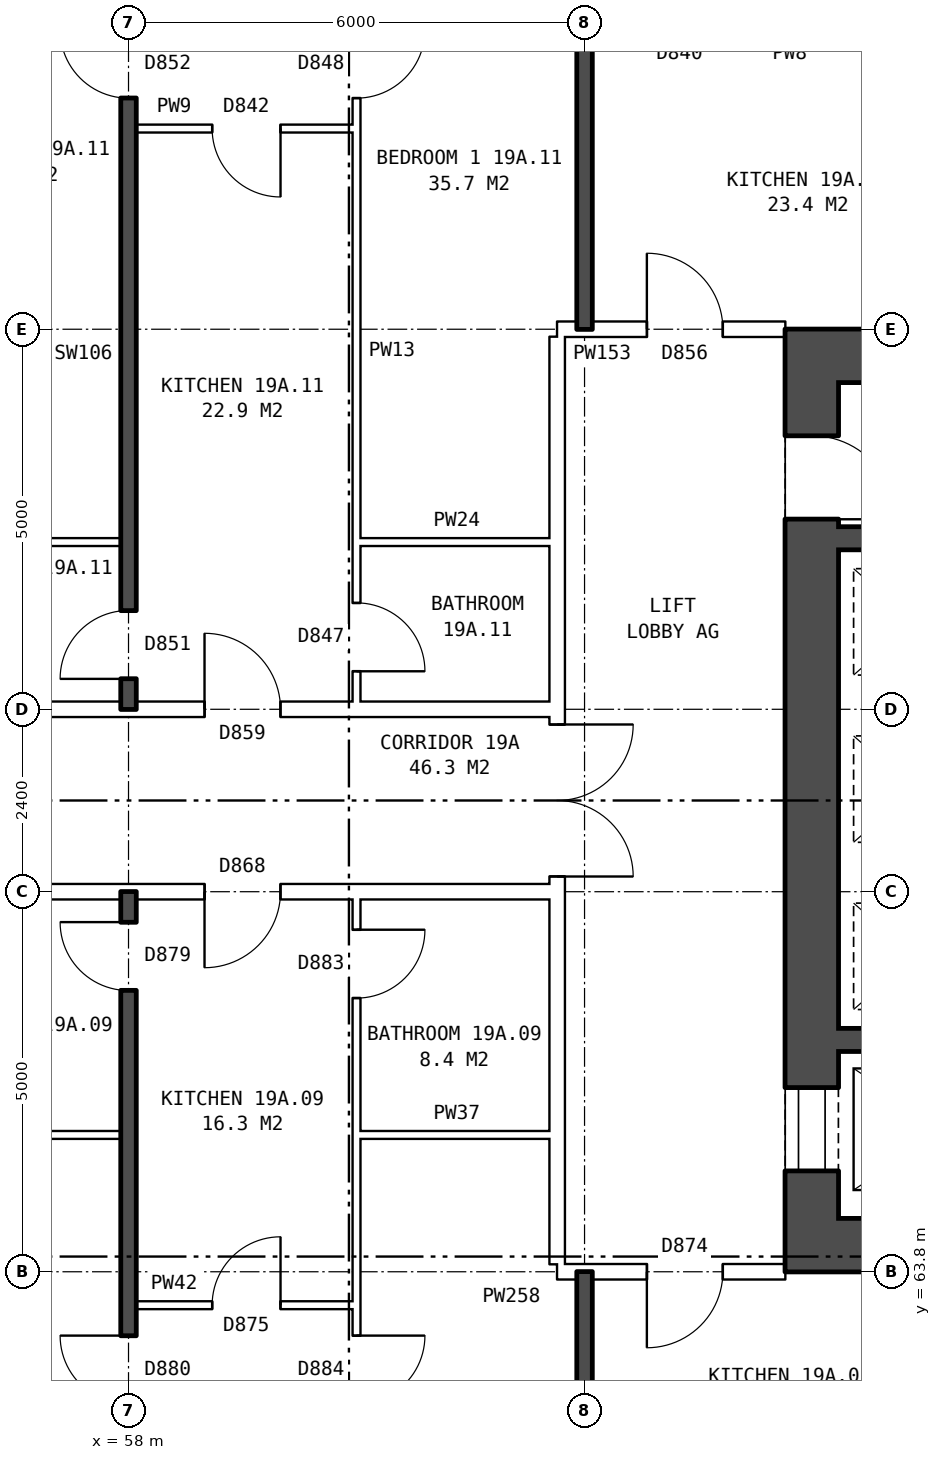
"""IFC4 building model, lengths in metres.
Left out: names, types, materials, properties, quantities, classifications, styles, units other than length and angle.
Written with IfcOpenShell. Run it as: python <this file> out.ifc"""

import sys

from ifc_helpers import new_model, si_unit, direction, frame, frame_2d, origin, place, context, subcontext, project, spatial, rectangle, extrude, element, fill, save


model = new_model("IFC4")
c1 = context("Model", 3, precision=1e-05, world=origin(), true_north=direction((0.0, 1.0)))
c2 = subcontext(c1, "Body", "Model", "MODEL_VIEW")
j1 = project(units=[si_unit("LENGTHUNIT", "METRE"), si_unit("PLANEANGLEUNIT", "RADIAN")], contexts=[c1])
p1 = place(None, origin())
s1 = spatial("IfcSite", under=j1, at=p1, CompositionType="ELEMENT")
p2 = place(p1, origin())
s2 = spatial("IfcBuilding", under=s1, at=p2, CompositionType="ELEMENT")
p3 = place(p2, frame((0.0, 0.0, 71.6)))
s3 = spatial("IfcBuildingStorey", under=s2, at=p3, CompositionType="ELEMENT", Elevation=71.6)
p4 = place(p3, frame((66.99, 64.5, 0.0), z_axis=(0.0, 0.0, 1.0), x_axis=(0.0, 1.0, 0.0)))
e1 = element("IfcWall", 1, at=p4, inside=s3, PredefinedType="SHEAR", context=c2, shape_type="SweptSolid", body=[
    extrude(rectangle(XDim=11.0, YDim=0.7, at=frame_2d((5.5, 0.0))), origin(), (0.0, 0.0, 1.0), 2.85),
])
p5 = place(p4, frame((0.625, 0.0, 0.0)))
e2 = element("IfcOpeningElement", 2, at=p5, cuts=e1, PredefinedType="OPENING", context=c2, shape_type="SweptSolid", body=[
    extrude(rectangle(XDim=1.1, YDim=2.1, at=frame_2d((0.55, 1.05))), frame((0.0, 0.36, 0.0), z_axis=(0.0, -1.0, 0.0), x_axis=(1.0, 0.0, 0.0)), (0.0, 0.0, 1.0), 0.72),
])
p6 = place(p4, frame((9.2, 0.0, 0.0)))
e3 = element("IfcOpeningElement", 3, at=p6, cuts=e1, PredefinedType="OPENING", context=c2, shape_type="SweptSolid", body=[
    extrude(rectangle(XDim=1.1, YDim=2.1, at=frame_2d((0.55, 1.05))), frame((0.0, 0.36, 0.0), z_axis=(0.0, -1.0, 0.0), x_axis=(1.0, 0.0, 0.0)), (0.0, 0.0, 1.0), 0.72),
])
for number, where, z_axis, x_axis in (
    (4, (66.64, 64.15, 0.0), (0.0, 0.0, 1.0), (1.0, 0.0, 0.0)),
    (5, (66.64, 75.85, 0.0), (0.0, 0.0, 1.0), (1.0, 0.0, 0.0)),
):
    element("IfcWall", number, at=place(p3, frame(where, z_axis=z_axis, x_axis=x_axis)), inside=s3, PredefinedType="SHEAR", context=c2, shape_type="SweptSolid", body=[
        extrude(rectangle(XDim=9.0, YDim=0.7, at=frame_2d((4.5, 0.0))), origin(), (0.0, 0.0, 1.0), 2.85),
    ])
p7 = place(p3, frame((67.34, 66.85, 0.0), z_axis=(0.0, 0.0, 1.0), x_axis=(1.0, 0.0, 0.0)))
e6 = element("IfcWall", 6, at=p7, inside=s3, PredefinedType="SHEAR", context=c2, shape_type="SweptSolid", body=[
    extrude(rectangle(XDim=3.32, YDim=0.3, at=frame_2d((1.66, 0.0))), origin(), (0.0, 0.0, 1.0), 2.85),
])
p8 = place(p3, frame((67.34, 73.45, 0.0), z_axis=(0.0, 0.0, 1.0), x_axis=(1.0, 0.0, 0.0)))
e7 = element("IfcWall", 7, at=p8, inside=s3, PredefinedType="SHEAR", context=c2, shape_type="SweptSolid", body=[
    extrude(rectangle(XDim=2.2, YDim=0.3, at=frame_2d((1.1, 0.0))), origin(), (0.0, 0.0, 1.0), 2.85),
])
p9 = place(p3, frame((63.64, 63.9, 0.0), z_axis=(0.0, 0.0, 1.0), x_axis=(0.0, 1.0, 0.0)))
e8 = element("IfcWall", 8, at=p9, inside=s3, PredefinedType="PARTITIONING", context=c2, shape_type="SweptSolid", body=[
    extrude(rectangle(XDim=12.2, YDim=0.2, at=frame_2d((6.1, 0.0))), origin(), (0.0, 0.0, 1.0), 2.85),
])
p10 = place(p9, frame((5.1, 0.0, 0.0)))
e9 = element("IfcOpeningElement", 9, at=p10, cuts=e8, PredefinedType="OPENING", context=c2, shape_type="SweptSolid", body=[
    extrude(rectangle(XDim=2.0, YDim=2.1, at=frame_2d((1.0, 1.05))), frame((0.0, 0.11, 0.0), z_axis=(0.0, -1.0, 0.0), x_axis=(1.0, 0.0, 0.0)), (0.0, 0.0, 1.0), 0.22),
])
p11 = place(p3, frame((58.1, 63.36, 0.0), z_axis=(0.0, 0.0, 1.0), x_axis=(1.0, 0.0, 0.0)))
e10 = element("IfcWall", 10, at=p11, inside=s3, PredefinedType="PARTITIONING", context=c2, shape_type="SweptSolid", body=[
    extrude(rectangle(XDim=2.9, YDim=0.1, at=frame_2d((1.45, 0.0))), origin(), (0.0, 0.0, 1.0), 2.85),
])
p12 = place(p11, frame((1.0, 0.0, 0.0)))
e11 = element("IfcOpeningElement", 11, at=p12, cuts=e10, PredefinedType="OPENING", context=c2, shape_type="SweptSolid", body=[
    extrude(rectangle(XDim=0.9, YDim=2.1, at=frame_2d((0.45, 1.05))), frame((0.0, 0.06, 0.0), z_axis=(0.0, -1.0, 0.0), x_axis=(1.0, 0.0, 0.0)), (0.0, 0.0, 1.0), 0.12),
])
p13 = place(p3, frame((63.64, 63.8, 0.0), z_axis=(0.0, 0.0, 1.0), x_axis=(1.0, 0.0, 0.0)))
e12 = element("IfcWall", 12, at=p13, inside=s3, PredefinedType="PARTITIONING", context=c2, shape_type="SweptSolid", body=[
    extrude(rectangle(XDim=3.0, YDim=0.2, at=frame_2d((1.5, 0.0))), origin(), (0.0, 0.0, 1.0), 2.85),
])
p14 = place(p13, frame((1.18, 0.0, 0.0)))
e13 = element("IfcOpeningElement", 13, at=p14, cuts=e12, PredefinedType="OPENING", context=c2, shape_type="SweptSolid", body=[
    extrude(rectangle(XDim=1.0, YDim=2.1, at=frame_2d((0.5, 1.05))), frame((0.0, 0.11, 0.0), z_axis=(0.0, -1.0, 0.0), x_axis=(1.0, 0.0, 0.0)), (0.0, 0.0, 1.0), 0.22),
])
p15 = place(p3, frame((55.1, 65.6, 0.0), z_axis=(0.0, 0.0, 1.0), x_axis=(1.0, 0.0, 0.0)))
e14 = element("IfcWall", 14, at=p15, inside=s3, PredefinedType="PARTITIONING", context=c2, shape_type="SweptSolid", body=[
    extrude(rectangle(XDim=2.8, YDim=0.1, at=frame_2d((1.4, 0.0))), origin(), (0.0, 0.0, 1.0), 2.85),
])
p16 = place(p3, frame((61.0, 65.6, 0.0), z_axis=(0.0, 0.0, 1.0), x_axis=(1.0, 0.0, 0.0)))
e15 = element("IfcWall", 15, at=p16, inside=s3, PredefinedType="PARTITIONING", context=c2, shape_type="SweptSolid", body=[
    extrude(rectangle(XDim=2.64, YDim=0.1, at=frame_2d((1.32, 0.0))), origin(), (0.0, 0.0, 1.0), 2.85),
])
p17 = place(p3, frame((44.36, 68.8, 0.0), z_axis=(0.0, 0.0, 1.0), x_axis=(1.0, 0.0, 0.0)))
e16 = element("IfcWall", 16, at=p17, inside=s3, PredefinedType="PARTITIONING", context=c2, shape_type="SweptSolid", body=[
    extrude(rectangle(XDim=19.28, YDim=0.2, at=frame_2d((9.64, 0.0))), origin(), (0.0, 0.0, 1.0), 2.85),
])
p18 = place(p17, frame((14.64, 0.0, 0.0)))
e17 = element("IfcOpeningElement", 17, at=p18, cuts=e16, PredefinedType="OPENING", context=c2, shape_type="SweptSolid", body=[
    extrude(rectangle(XDim=1.0, YDim=2.1, at=frame_2d((0.5, 1.05))), frame((0.0, 0.11, 0.0), z_axis=(0.0, -1.0, 0.0), x_axis=(1.0, 0.0, 0.0)), (0.0, 0.0, 1.0), 0.22),
])
p19 = place(p17, frame((5.64, 0.0, 0.0)))
e18 = element("IfcOpeningElement", 18, at=p19, cuts=e16, PredefinedType="OPENING", context=c2, shape_type="SweptSolid", body=[
    extrude(rectangle(XDim=1.0, YDim=2.1, at=frame_2d((0.5, 1.05))), frame((0.0, 0.11, 0.0), z_axis=(0.0, -1.0, 0.0), x_axis=(1.0, 0.0, 0.0)), (0.0, 0.0, 1.0), 0.22),
])
p20 = place(p3, frame((44.36, 71.2, 0.0), z_axis=(0.0, 0.0, 1.0), x_axis=(1.0, 0.0, 0.0)))
e19 = element("IfcWall", 19, at=p20, inside=s3, PredefinedType="PARTITIONING", context=c2, shape_type="SweptSolid", body=[
    extrude(rectangle(XDim=19.28, YDim=0.2, at=frame_2d((9.64, 0.0))), origin(), (0.0, 0.0, 1.0), 2.85),
])
p21 = place(p20, frame((14.64, 0.0, 0.0)))
e20 = element("IfcOpeningElement", 20, at=p21, cuts=e19, PredefinedType="OPENING", context=c2, shape_type="SweptSolid", body=[
    extrude(rectangle(XDim=1.0, YDim=2.1, at=frame_2d((0.5, 1.05))), frame((0.0, 0.11, 0.0), z_axis=(0.0, -1.0, 0.0), x_axis=(1.0, 0.0, 0.0)), (0.0, 0.0, 1.0), 0.22),
])
p22 = place(p20, frame((5.64, 0.0, 0.0)))
e21 = element("IfcOpeningElement", 21, at=p22, cuts=e19, PredefinedType="OPENING", context=c2, shape_type="SweptSolid", body=[
    extrude(rectangle(XDim=1.0, YDim=2.1, at=frame_2d((0.5, 1.05))), frame((0.0, 0.11, 0.0), z_axis=(0.0, -1.0, 0.0), x_axis=(1.0, 0.0, 0.0)), (0.0, 0.0, 1.0), 0.22),
])
p23 = place(p3, frame((55.1, 73.4, 0.0), z_axis=(0.0, 0.0, 1.0), x_axis=(1.0, 0.0, 0.0)))
e22 = element("IfcWall", 22, at=p23, inside=s3, PredefinedType="PARTITIONING", context=c2, shape_type="SweptSolid", body=[
    extrude(rectangle(XDim=2.8, YDim=0.1, at=frame_2d((1.4, 0.0))), origin(), (0.0, 0.0, 1.0), 2.85),
])
p24 = place(p3, frame((61.0, 73.4, 0.0), z_axis=(0.0, 0.0, 1.0), x_axis=(1.0, 0.0, 0.0)))
e23 = element("IfcWall", 23, at=p24, inside=s3, PredefinedType="PARTITIONING", context=c2, shape_type="SweptSolid", body=[
    extrude(rectangle(XDim=2.64, YDim=0.1, at=frame_2d((1.32, 0.0))), origin(), (0.0, 0.0, 1.0), 2.85),
])
p25 = place(p3, frame((63.64, 76.2, 0.0), z_axis=(0.0, 0.0, 1.0), x_axis=(1.0, 0.0, 0.0)))
e24 = element("IfcWall", 24, at=p25, inside=s3, PredefinedType="PARTITIONING", context=c2, shape_type="SweptSolid", body=[
    extrude(rectangle(XDim=3.0, YDim=0.2, at=frame_2d((1.5, 0.0))), origin(), (0.0, 0.0, 1.0), 2.85),
])
p26 = place(p25, frame((1.18, 0.0, 0.0)))
e25 = element("IfcOpeningElement", 25, at=p26, cuts=e24, PredefinedType="OPENING", context=c2, shape_type="SweptSolid", body=[
    extrude(rectangle(XDim=1.0, YDim=2.1, at=frame_2d((0.5, 1.05))), frame((0.0, 0.11, 0.0), z_axis=(0.0, -1.0, 0.0), x_axis=(1.0, 0.0, 0.0)), (0.0, 0.0, 1.0), 0.22),
])
p27 = place(p3, frame((58.1, 78.84, 0.0), z_axis=(0.0, 0.0, 1.0), x_axis=(1.0, 0.0, 0.0)))
e26 = element("IfcWall", 26, at=p27, inside=s3, PredefinedType="PARTITIONING", context=c2, shape_type="SweptSolid", body=[
    extrude(rectangle(XDim=2.9, YDim=0.1, at=frame_2d((1.45, 0.0))), origin(), (0.0, 0.0, 1.0), 2.85),
])
p28 = place(p27, frame((1.0, 0.0, 0.0)))
e27 = element("IfcOpeningElement", 27, at=p28, cuts=e26, PredefinedType="OPENING", context=c2, shape_type="SweptSolid", body=[
    extrude(rectangle(XDim=0.9, YDim=2.1, at=frame_2d((0.45, 1.05))), frame((0.0, 0.06, 0.0), z_axis=(0.0, -1.0, 0.0), x_axis=(1.0, 0.0, 0.0)), (0.0, 0.0, 1.0), 0.12),
])
p29 = place(p3, frame((58.0, 54.36, 0.0), z_axis=(0.0, 0.0, 1.0), x_axis=(0.0, 1.0, 0.0)))
e28 = element("IfcWall", 28, at=p29, inside=s3, PredefinedType="SOLIDWALL", context=c2, shape_type="SweptSolid", body=[
    extrude(rectangle(XDim=14.44, YDim=0.2, at=frame_2d((7.22, 0.0))), origin(), (0.0, 0.0, 1.0), 2.85),
])
p30 = place(p29, frame((7.7, 0.0, 0.0)))
e29 = element("IfcOpeningElement", 29, at=p30, cuts=e28, PredefinedType="OPENING", context=c2, shape_type="SweptSolid", body=[
    extrude(rectangle(XDim=0.9, YDim=2.1, at=frame_2d((0.45, 1.05))), frame((0.0, 0.11, 0.0), z_axis=(0.0, -1.0, 0.0), x_axis=(1.0, 0.0, 0.0)), (0.0, 0.0, 1.0), 0.22),
])
p31 = place(p29, frame((13.14, 0.0, 0.0)))
e30 = element("IfcOpeningElement", 30, at=p31, cuts=e28, PredefinedType="OPENING", context=c2, shape_type="SweptSolid", body=[
    extrude(rectangle(XDim=0.9, YDim=2.1, at=frame_2d((0.45, 1.05))), frame((0.0, 0.11, 0.0), z_axis=(0.0, -1.0, 0.0), x_axis=(1.0, 0.0, 0.0)), (0.0, 0.0, 1.0), 0.22),
])
p32 = place(p3, frame((58.0, 71.2, 0.0), z_axis=(0.0, 0.0, 1.0), x_axis=(0.0, 1.0, 0.0)))
e31 = element("IfcWall", 31, at=p32, inside=s3, PredefinedType="SOLIDWALL", context=c2, shape_type="SweptSolid", body=[
    extrude(rectangle(XDim=14.44, YDim=0.2, at=frame_2d((7.22, 0.0))), origin(), (0.0, 0.0, 1.0), 2.85),
])
p33 = place(p32, frame((8.04, 0.0, 0.0)))
e32 = element("IfcOpeningElement", 32, at=p33, cuts=e31, PredefinedType="OPENING", context=c2, shape_type="SweptSolid", body=[
    extrude(rectangle(XDim=0.9, YDim=2.1, at=frame_2d((0.45, 1.05))), frame((0.0, 0.11, 0.0), z_axis=(0.0, -1.0, 0.0), x_axis=(1.0, 0.0, 0.0)), (0.0, 0.0, 1.0), 0.22),
])
p34 = place(p32, frame((0.4, 0.0, 0.0)))
e33 = element("IfcOpeningElement", 33, at=p34, cuts=e31, PredefinedType="OPENING", context=c2, shape_type="SweptSolid", body=[
    extrude(rectangle(XDim=0.9, YDim=2.1, at=frame_2d((0.45, 1.05))), frame((0.0, 0.11, 0.0), z_axis=(0.0, -1.0, 0.0), x_axis=(1.0, 0.0, 0.0)), (0.0, 0.0, 1.0), 0.22),
])
p35 = place(p3, frame((61.0, 54.36, 0.0), z_axis=(0.0, 0.0, 1.0), x_axis=(0.0, 1.0, 0.0)))
e34 = element("IfcWall", 34, at=p35, inside=s3, PredefinedType="PARTITIONING", context=c2, shape_type="SweptSolid", body=[
    extrude(rectangle(XDim=14.34, YDim=0.1, at=frame_2d((7.17, 0.0))), origin(), (0.0, 0.0, 1.0), 2.85),
])
p36 = place(p35, frame((7.7, 0.0, 0.0)))
e35 = element("IfcOpeningElement", 35, at=p36, cuts=e34, PredefinedType="OPENING", context=c2, shape_type="SweptSolid", body=[
    extrude(rectangle(XDim=0.9, YDim=2.1, at=frame_2d((0.45, 1.05))), frame((0.0, 0.06, 0.0), z_axis=(0.0, -1.0, 0.0), x_axis=(1.0, 0.0, 0.0)), (0.0, 0.0, 1.0), 0.12),
])
p37 = place(p35, frame((13.04, 0.0, 0.0)))
e36 = element("IfcOpeningElement", 36, at=p37, cuts=e34, PredefinedType="OPENING", context=c2, shape_type="SweptSolid", body=[
    extrude(rectangle(XDim=0.9, YDim=2.1, at=frame_2d((0.45, 1.05))), frame((0.0, 0.06, 0.0), z_axis=(0.0, -1.0, 0.0), x_axis=(1.0, 0.0, 0.0)), (0.0, 0.0, 1.0), 0.12),
])
p38 = place(p3, frame((61.0, 71.3, 0.0), z_axis=(0.0, 0.0, 1.0), x_axis=(0.0, 1.0, 0.0)))
e37 = element("IfcWall", 37, at=p38, inside=s3, PredefinedType="PARTITIONING", context=c2, shape_type="SweptSolid", body=[
    extrude(rectangle(XDim=14.34, YDim=0.1, at=frame_2d((7.17, 0.0))), origin(), (0.0, 0.0, 1.0), 2.85),
])
p39 = place(p38, frame((7.94, 0.0, 0.0)))
e38 = element("IfcOpeningElement", 38, at=p39, cuts=e37, PredefinedType="OPENING", context=c2, shape_type="SweptSolid", body=[
    extrude(rectangle(XDim=0.9, YDim=2.1, at=frame_2d((0.45, 1.05))), frame((0.0, 0.06, 0.0), z_axis=(0.0, -1.0, 0.0), x_axis=(1.0, 0.0, 0.0)), (0.0, 0.0, 1.0), 0.12),
])
p40 = place(p38, frame((0.4, 0.0, 0.0)))
e39 = element("IfcOpeningElement", 39, at=p40, cuts=e37, PredefinedType="OPENING", context=c2, shape_type="SweptSolid", body=[
    extrude(rectangle(XDim=0.9, YDim=2.1, at=frame_2d((0.45, 1.05))), frame((0.0, 0.06, 0.0), z_axis=(0.0, -1.0, 0.0), x_axis=(1.0, 0.0, 0.0)), (0.0, 0.0, 1.0), 0.12),
])
for number, where, z_axis, x_axis in (
    (40, (64.0, 54.36, 0.0), (0.0, 0.0, 1.0), (0.0, 1.0, 0.0)),
    (41, (64.0, 76.2, 0.0), (0.0, 0.0, 1.0), (0.0, 1.0, 0.0)),
):
    element("IfcWall", number, at=place(p3, frame(where, z_axis=z_axis, x_axis=x_axis)), inside=s3, PredefinedType="SOLIDWALL", context=c2, shape_type="SweptSolid", body=[
        extrude(rectangle(XDim=9.44, YDim=0.2, at=frame_2d((4.72, 0.0))), origin(), (0.0, 0.0, 1.0), 2.85),
    ])
p41 = place(p5, origin())
e42 = element("IfcDoor", 42, at=p41, inside=s3, OperationType="DOUBLE_DOOR_SLIDING", PredefinedType="DOOR", context=c2, shape_type="SweptSolid", body=[
    extrude(rectangle(XDim=1.1, YDim=2.1, at=frame_2d((0.55, 1.05))), frame((0.0, -0.285, 0.0), z_axis=(0.0, -1.0, 0.0), x_axis=(1.0, 0.0, 0.0)), (0.0, 0.0, 1.0), 0.05),
])
fill(e2, e42)
p42 = place(p6, frame((1.1, 0.0, 0.0), z_axis=(0.0, 0.0, 1.0), x_axis=(-1.0, 0.0, 0.0)))
e43 = element("IfcDoor", 43, at=p42, inside=s3, OperationType="SINGLE_SWING_RIGHT", PredefinedType="DOOR", context=c2, shape_type="SweptSolid", body=[
    extrude(rectangle(XDim=1.1, YDim=2.1, at=frame_2d((0.55, 1.05))), frame((0.0, 0.335, 0.0), z_axis=(0.0, -1.0, 0.0), x_axis=(1.0, 0.0, 0.0)), (0.0, 0.0, 1.0), 0.05),
])
fill(e3, e43)
p43 = place(p10, frame((2.0, 0.0, 0.0), z_axis=(0.0, 0.0, 1.0), x_axis=(-1.0, 0.0, 0.0)))
e44 = element("IfcDoor", 44, at=p43, inside=s3, OperationType="DOUBLE_DOOR_SINGLE_SWING", PredefinedType="DOOR", context=c2, shape_type="SweptSolid", body=[
    extrude(rectangle(XDim=2.0, YDim=2.1, at=frame_2d((1.0, 1.05))), frame((0.0, 0.025, 0.0), z_axis=(0.0, -1.0, 0.0), x_axis=(1.0, 0.0, 0.0)), (0.0, 0.0, 1.0), 0.05),
])
fill(e9, e44)
p44 = place(p14, frame((1.0, 0.0, 0.0), z_axis=(0.0, 0.0, 1.0), x_axis=(-1.0, 0.0, 0.0)))
e45 = element("IfcDoor", 45, at=p44, inside=s3, OperationType="SINGLE_SWING_RIGHT", PredefinedType="DOOR", context=c2, shape_type="SweptSolid", body=[
    extrude(rectangle(XDim=1.0, YDim=2.1, at=frame_2d((0.5, 1.05))), frame((0.0, 0.025, 0.0), z_axis=(0.0, -1.0, 0.0), x_axis=(1.0, 0.0, 0.0)), (0.0, 0.0, 1.0), 0.05),
])
fill(e13, e45)
p45 = place(p26, origin())
e46 = element("IfcDoor", 46, at=p45, inside=s3, OperationType="SINGLE_SWING_LEFT", PredefinedType="DOOR", context=c2, shape_type="SweptSolid", body=[
    extrude(rectangle(XDim=1.0, YDim=2.1, at=frame_2d((0.5, 1.05))), frame((0.0, 0.025, 0.0), z_axis=(0.0, -1.0, 0.0), x_axis=(1.0, 0.0, 0.0)), (0.0, 0.0, 1.0), 0.05),
])
fill(e25, e46)
p46 = place(p36, frame((0.9, 0.0, 0.0), z_axis=(0.0, 0.0, 1.0), x_axis=(-1.0, 0.0, 0.0)))
e47 = element("IfcDoor", 47, at=p46, inside=s3, OperationType="SINGLE_SWING_LEFT", PredefinedType="DOOR", context=c2, shape_type="SweptSolid", body=[
    extrude(rectangle(XDim=0.9, YDim=2.1, at=frame_2d((0.45, 1.05))), frame((0.0, 0.025, 0.0), z_axis=(0.0, -1.0, 0.0), x_axis=(1.0, 0.0, 0.0)), (0.0, 0.0, 1.0), 0.05),
])
fill(e35, e47)
p47 = place(p30, origin())
e48 = element("IfcDoor", 48, at=p47, inside=s3, OperationType="SINGLE_SWING_RIGHT", PredefinedType="DOOR", context=c2, shape_type="SweptSolid", body=[
    extrude(rectangle(XDim=0.9, YDim=2.1, at=frame_2d((0.45, 1.05))), frame((0.0, 0.025, 0.0), z_axis=(0.0, -1.0, 0.0), x_axis=(1.0, 0.0, 0.0)), (0.0, 0.0, 1.0), 0.05),
])
fill(e29, e48)
p48 = place(p18, frame((1.0, 0.0, 0.0), z_axis=(0.0, 0.0, 1.0), x_axis=(-1.0, 0.0, 0.0)))
e49 = element("IfcDoor", 49, at=p48, inside=s3, OperationType="SINGLE_SWING_RIGHT", PredefinedType="DOOR", context=c2, shape_type="SweptSolid", body=[
    extrude(rectangle(XDim=1.0, YDim=2.1, at=frame_2d((0.5, 1.05))), frame((0.0, 0.025, 0.0), z_axis=(0.0, -1.0, 0.0), x_axis=(1.0, 0.0, 0.0)), (0.0, 0.0, 1.0), 0.05),
])
fill(e17, e49)
p49 = place(p12, origin())
e50 = element("IfcDoor", 50, at=p49, inside=s3, OperationType="SINGLE_SWING_RIGHT", PredefinedType="DOOR", context=c2, shape_type="SweptSolid", body=[
    extrude(rectangle(XDim=0.9, YDim=2.1, at=frame_2d((0.45, 1.05))), frame((0.0, 0.025, 0.0), z_axis=(0.0, -1.0, 0.0), x_axis=(1.0, 0.0, 0.0)), (0.0, 0.0, 1.0), 0.05),
])
fill(e11, e50)
p50 = place(p37, frame((0.9, 0.0, 0.0), z_axis=(0.0, 0.0, 1.0), x_axis=(-1.0, 0.0, 0.0)))
e51 = element("IfcDoor", 51, at=p50, inside=s3, OperationType="SINGLE_SWING_LEFT", PredefinedType="DOOR", context=c2, shape_type="SweptSolid", body=[
    extrude(rectangle(XDim=0.9, YDim=2.1, at=frame_2d((0.45, 1.05))), frame((0.0, 0.025, 0.0), z_axis=(0.0, -1.0, 0.0), x_axis=(1.0, 0.0, 0.0)), (0.0, 0.0, 1.0), 0.05),
])
fill(e36, e51)
p51 = place(p31, origin())
e52 = element("IfcDoor", 52, at=p51, inside=s3, OperationType="SINGLE_SWING_RIGHT", PredefinedType="DOOR", context=c2, shape_type="SweptSolid", body=[
    extrude(rectangle(XDim=0.9, YDim=2.1, at=frame_2d((0.45, 1.05))), frame((0.0, 0.025, 0.0), z_axis=(0.0, -1.0, 0.0), x_axis=(1.0, 0.0, 0.0)), (0.0, 0.0, 1.0), 0.05),
])
fill(e30, e52)
p52 = place(p39, frame((0.9, 0.0, 0.0), z_axis=(0.0, 0.0, 1.0), x_axis=(-1.0, 0.0, 0.0)))
e53 = element("IfcDoor", 53, at=p52, inside=s3, OperationType="SINGLE_SWING_LEFT", PredefinedType="DOOR", context=c2, shape_type="SweptSolid", body=[
    extrude(rectangle(XDim=0.9, YDim=2.1, at=frame_2d((0.45, 1.05))), frame((0.0, 0.025, 0.0), z_axis=(0.0, -1.0, 0.0), x_axis=(1.0, 0.0, 0.0)), (0.0, 0.0, 1.0), 0.05),
])
fill(e38, e53)
p53 = place(p33, origin())
e54 = element("IfcDoor", 54, at=p53, inside=s3, OperationType="SINGLE_SWING_RIGHT", PredefinedType="DOOR", context=c2, shape_type="SweptSolid", body=[
    extrude(rectangle(XDim=0.9, YDim=2.1, at=frame_2d((0.45, 1.05))), frame((0.0, 0.025, 0.0), z_axis=(0.0, -1.0, 0.0), x_axis=(1.0, 0.0, 0.0)), (0.0, 0.0, 1.0), 0.05),
])
fill(e32, e54)
p54 = place(p21, origin())
e55 = element("IfcDoor", 55, at=p54, inside=s3, OperationType="SINGLE_SWING_LEFT", PredefinedType="DOOR", context=c2, shape_type="SweptSolid", body=[
    extrude(rectangle(XDim=1.0, YDim=2.1, at=frame_2d((0.5, 1.05))), frame((0.0, 0.025, 0.0), z_axis=(0.0, -1.0, 0.0), x_axis=(1.0, 0.0, 0.0)), (0.0, 0.0, 1.0), 0.05),
])
fill(e20, e55)
p55 = place(p28, frame((0.9, 0.0, 0.0), z_axis=(0.0, 0.0, 1.0), x_axis=(-1.0, 0.0, 0.0)))
e56 = element("IfcDoor", 56, at=p55, inside=s3, OperationType="SINGLE_SWING_LEFT", PredefinedType="DOOR", context=c2, shape_type="SweptSolid", body=[
    extrude(rectangle(XDim=0.9, YDim=2.1, at=frame_2d((0.45, 1.05))), frame((0.0, 0.025, 0.0), z_axis=(0.0, -1.0, 0.0), x_axis=(1.0, 0.0, 0.0)), (0.0, 0.0, 1.0), 0.05),
])
fill(e27, e56)
p56 = place(p40, frame((0.9, 0.0, 0.0), z_axis=(0.0, 0.0, 1.0), x_axis=(-1.0, 0.0, 0.0)))
e57 = element("IfcDoor", 57, at=p56, inside=s3, OperationType="SINGLE_SWING_RIGHT", PredefinedType="DOOR", context=c2, shape_type="SweptSolid", body=[
    extrude(rectangle(XDim=0.9, YDim=2.1, at=frame_2d((0.45, 1.05))), frame((0.0, 0.025, 0.0), z_axis=(0.0, -1.0, 0.0), x_axis=(1.0, 0.0, 0.0)), (0.0, 0.0, 1.0), 0.05),
])
fill(e39, e57)
p57 = place(p34, origin())
e58 = element("IfcDoor", 58, at=p57, inside=s3, OperationType="SINGLE_SWING_LEFT", PredefinedType="DOOR", context=c2, shape_type="SweptSolid", body=[
    extrude(rectangle(XDim=0.9, YDim=2.1, at=frame_2d((0.45, 1.05))), frame((0.0, 0.025, 0.0), z_axis=(0.0, -1.0, 0.0), x_axis=(1.0, 0.0, 0.0)), (0.0, 0.0, 1.0), 0.05),
])
fill(e33, e58)
save(model, sys.argv[1])
